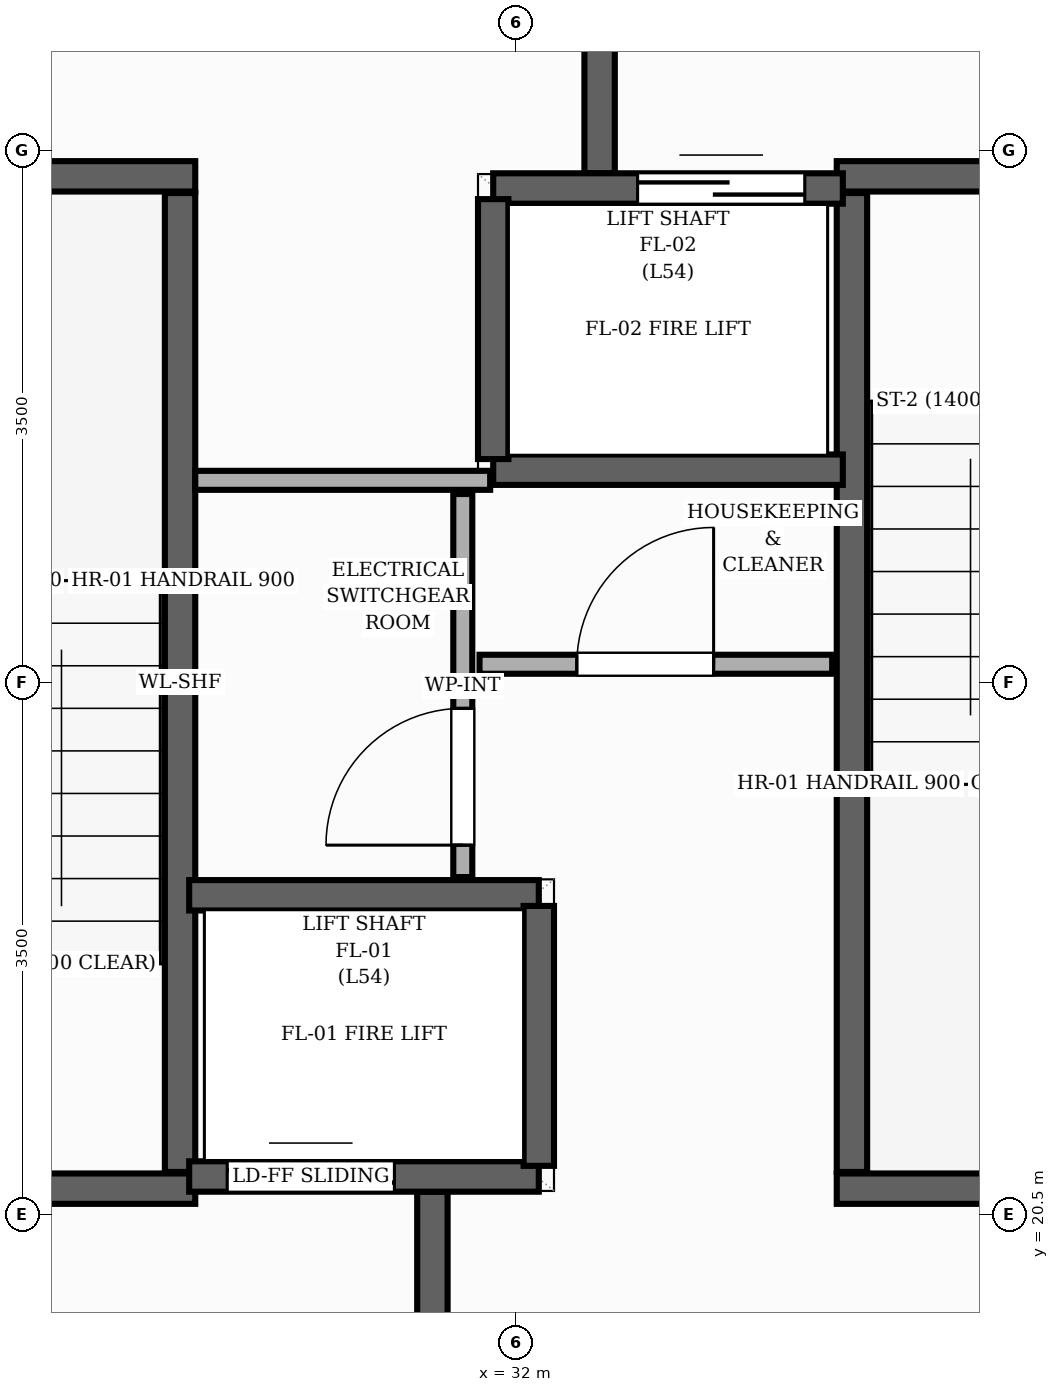
"""IFC4 building model, lengths in metres.
Left out: names, types, materials, properties, quantities, classifications, styles, units other than length and angle.
Written with IfcOpenShell. Run it as: python <this file> out.ifc"""

import sys

from ifc_helpers import new_model, si_unit, direction, frame, frame_2d, origin, place, context, subcontext, project, spatial, rectangle, extrude, element, fill, save


model = new_model("IFC4")
c1 = context("Model", 3, precision=1e-05, world=origin(), true_north=direction((0.0, 1.0)))
c2 = subcontext(c1, "Body", "Model", "MODEL_VIEW")
j1 = project(units=[si_unit("LENGTHUNIT", "METRE"), si_unit("PLANEANGLEUNIT", "RADIAN")], contexts=[c1])
p1 = place(None, origin())
s1 = spatial("IfcSite", under=j1, at=p1, CompositionType="ELEMENT")
p2 = place(p1, origin())
s2 = spatial("IfcBuilding", under=s1, at=p2, CompositionType="ELEMENT")
p3 = place(p2, frame((0.0, 0.0, 182.24)))
s3 = spatial("IfcBuildingStorey", under=s2, at=p3, CompositionType="ELEMENT", Elevation=182.24)
p4 = place(p3, frame((29.79, 20.78, 0.0), z_axis=(0.0, 0.0, 1.0), x_axis=(0.0, 1.0, 0.0)))
e1 = element("IfcWall", 1, at=p4, inside=s3, PredefinedType="SHEAR", context=c2, shape_type="SweptSolid", body=[
    extrude(rectangle(XDim=6.44, YDim=0.2, at=frame_2d((3.22, 0.0))), origin(), (0.0, 0.0, 1.0), 3.2),
])
p5 = place(p3, frame((26.65, 27.33, 0.0), z_axis=(0.0, 0.0, 1.0), x_axis=(1.0, 0.0, 0.0)))
e2 = element("IfcWall", 2, at=p5, inside=s3, PredefinedType="SHEAR", context=c2, shape_type="SweptSolid", body=[
    extrude(rectangle(XDim=3.24, YDim=0.2, at=frame_2d((1.62, 0.0))), origin(), (0.0, 0.0, 1.0), 3.2),
])
p6 = place(p3, frame((26.65, 20.67, 0.0), z_axis=(0.0, 0.0, 1.0), x_axis=(1.0, 0.0, 0.0)))
e3 = element("IfcWall", 3, at=p6, inside=s3, PredefinedType="SHEAR", context=c2, shape_type="SweptSolid", body=[
    extrude(rectangle(XDim=3.24, YDim=0.2, at=frame_2d((1.62, 0.0))), origin(), (0.0, 0.0, 1.0), 3.2),
])
p7 = place(p6, frame((1.055, 0.0, 0.0)))
e4 = element("IfcOpeningElement", 4, at=p7, cuts=e3, PredefinedType="OPENING", context=c2, shape_type="SweptSolid", body=[
    extrude(rectangle(XDim=1.05, YDim=2.15, at=frame_2d((0.525, 1.075))), frame((0.0, 0.11, 0.0), z_axis=(0.0, -1.0, 0.0), x_axis=(1.0, 0.0, 0.0)), (0.0, 0.0, 1.0), 0.22),
])
p8 = place(p3, frame((34.21, 20.78, 0.0), z_axis=(0.0, 0.0, 1.0), x_axis=(0.0, 1.0, 0.0)))
e5 = element("IfcWall", 5, at=p8, inside=s3, PredefinedType="SHEAR", context=c2, shape_type="SweptSolid", body=[
    extrude(rectangle(XDim=6.44, YDim=0.2, at=frame_2d((3.22, 0.0))), origin(), (0.0, 0.0, 1.0), 3.2),
])
p9 = place(p3, frame((34.11, 20.67, 0.0), z_axis=(0.0, 0.0, 1.0), x_axis=(1.0, 0.0, 0.0)))
e6 = element("IfcWall", 6, at=p9, inside=s3, PredefinedType="SHEAR", context=c2, shape_type="SweptSolid", body=[
    extrude(rectangle(XDim=3.24, YDim=0.2, at=frame_2d((1.62, 0.0))), origin(), (0.0, 0.0, 1.0), 3.2),
])
p10 = place(p3, frame((34.11, 27.33, 0.0), z_axis=(0.0, 0.0, 1.0), x_axis=(1.0, 0.0, 0.0)))
e7 = element("IfcWall", 7, at=p10, inside=s3, PredefinedType="SHEAR", context=c2, shape_type="SweptSolid", body=[
    extrude(rectangle(XDim=3.24, YDim=0.2, at=frame_2d((1.62, 0.0))), origin(), (0.0, 0.0, 1.0), 3.2),
])
p11 = place(p10, frame((1.135, 0.0, 0.0)))
e8 = element("IfcOpeningElement", 8, at=p11, cuts=e7, PredefinedType="OPENING", context=c2, shape_type="SweptSolid", body=[
    extrude(rectangle(XDim=1.05, YDim=2.15, at=frame_2d((0.525, 1.075))), frame((0.0, 0.11, 0.0), z_axis=(0.0, -1.0, 0.0), x_axis=(1.0, 0.0, 0.0)), (0.0, 0.0, 1.0), 0.22),
])
for number, where, z_axis, x_axis in (
    (9, (31.45, 17.15, 0.0), (0.0, 0.0, 1.0), (0.0, 1.0, 0.0)),
    (10, (32.55, 27.35, 0.0), (0.0, 0.0, 1.0), (0.0, 1.0, 0.0)),
):
    element("IfcWall", number, at=place(p3, frame(where, z_axis=z_axis, x_axis=x_axis)), inside=s3, PredefinedType="SHEAR", context=c2, shape_type="SweptSolid", body=[
        extrude(rectangle(XDim=3.5, YDim=0.2, at=frame_2d((1.75, 0.0))), origin(), (0.0, 0.0, 1.0), 3.2),
    ])
p12 = place(p3, frame((29.85, 20.75, 0.0), z_axis=(0.0, 0.0, 1.0), x_axis=(1.0, 0.0, 0.0)))
e11 = element("IfcWall", 11, at=p12, inside=s3, PredefinedType="SHEAR", context=c2, shape_type="SweptSolid", body=[
    extrude(rectangle(XDim=2.3, YDim=0.2, at=frame_2d((1.15, 0.0))), origin(), (0.0, 0.0, 1.0), 3.2),
])
p13 = place(p12, frame((0.25, 0.0, 0.0)))
e12 = element("IfcOpeningElement", 12, at=p13, cuts=e11, PredefinedType="OPENING", context=c2, shape_type="SweptSolid", body=[
    extrude(rectangle(XDim=1.1, YDim=2.15, at=frame_2d((0.55, 1.075))), frame((0.0, 0.11, 0.0), z_axis=(0.0, -1.0, 0.0), x_axis=(1.0, 0.0, 0.0)), (0.0, 0.0, 1.0), 0.22),
])
p14 = place(p3, frame((29.85, 22.6, 0.0), z_axis=(0.0, 0.0, 1.0), x_axis=(1.0, 0.0, 0.0)))
e13 = element("IfcWall", 13, at=p14, inside=s3, PredefinedType="SHEAR", context=c2, shape_type="SweptSolid", body=[
    extrude(rectangle(XDim=2.3, YDim=0.2, at=frame_2d((1.15, 0.0))), origin(), (0.0, 0.0, 1.0), 3.2),
])
p15 = place(p3, frame((32.15, 20.82, 0.0), z_axis=(0.0, 0.0, 1.0), x_axis=(0.0, 1.0, 0.0)))
e14 = element("IfcWall", 14, at=p15, inside=s3, PredefinedType="SHEAR", context=c2, shape_type="SweptSolid", body=[
    extrude(rectangle(XDim=1.71, YDim=0.2, at=frame_2d((0.855, 0.0))), origin(), (0.0, 0.0, 1.0), 3.2),
])
p16 = place(p3, frame((31.85, 27.25, 0.0), z_axis=(0.0, 0.0, 1.0), x_axis=(1.0, 0.0, 0.0)))
e15 = element("IfcWall", 15, at=p16, inside=s3, PredefinedType="SHEAR", context=c2, shape_type="SweptSolid", body=[
    extrude(rectangle(XDim=2.3, YDim=0.2, at=frame_2d((1.15, 0.0))), origin(), (0.0, 0.0, 1.0), 3.2),
])
p17 = place(p16, frame((0.95, 0.0, 0.0)))
e16 = element("IfcOpeningElement", 16, at=p17, cuts=e15, PredefinedType="OPENING", context=c2, shape_type="SweptSolid", body=[
    extrude(rectangle(XDim=1.1, YDim=2.15, at=frame_2d((0.55, 1.075))), frame((0.0, 0.11, 0.0), z_axis=(0.0, -1.0, 0.0), x_axis=(1.0, 0.0, 0.0)), (0.0, 0.0, 1.0), 0.22),
])
p18 = place(p3, frame((31.85, 25.4, 0.0), z_axis=(0.0, 0.0, 1.0), x_axis=(1.0, 0.0, 0.0)))
e17 = element("IfcWall", 17, at=p18, inside=s3, PredefinedType="SHEAR", context=c2, shape_type="SweptSolid", body=[
    extrude(rectangle(XDim=2.3, YDim=0.2, at=frame_2d((1.15, 0.0))), origin(), (0.0, 0.0, 1.0), 3.2),
])
p19 = place(p3, frame((31.85, 25.47, 0.0), z_axis=(0.0, 0.0, 1.0), x_axis=(0.0, 1.0, 0.0)))
e18 = element("IfcWall", 18, at=p19, inside=s3, PredefinedType="SHEAR", context=c2, shape_type="SweptSolid", body=[
    extrude(rectangle(XDim=1.71, YDim=0.2, at=frame_2d((0.855, 0.0))), origin(), (0.0, 0.0, 1.0), 3.2),
])
p20 = place(p3, frame((31.65, 22.72, 0.0), z_axis=(0.0, 0.0, 1.0), x_axis=(0.0, 1.0, 0.0)))
e19 = element("IfcWall", 19, at=p20, inside=s3, PredefinedType="PARTITIONING", context=c2, shape_type="SweptSolid", body=[
    extrude(rectangle(XDim=2.52, YDim=0.125, at=frame_2d((1.26, 0.0))), origin(), (0.0, 0.0, 1.0), 2.955),
])
p21 = place(p20, frame((0.21, 0.0, 0.0)))
e20 = element("IfcOpeningElement", 20, at=p21, cuts=e19, PredefinedType="OPENING", context=c2, shape_type="SweptSolid", body=[
    extrude(rectangle(XDim=0.9, YDim=2.1, at=frame_2d((0.45, 1.05))), frame((0.0, 0.073, 0.0), z_axis=(0.0, -1.0, 0.0), x_axis=(1.0, 0.0, 0.0)), (0.0, 0.0, 1.0), 0.145),
])
p22 = place(p3, frame((31.76, 24.12, 0.0), z_axis=(0.0, 0.0, 1.0), x_axis=(1.0, 0.0, 0.0)))
e21 = element("IfcWall", 21, at=p22, inside=s3, PredefinedType="PARTITIONING", context=c2, shape_type="SweptSolid", body=[
    extrude(rectangle(XDim=2.32, YDim=0.125, at=frame_2d((1.16, 0.0))), origin(), (0.0, 0.0, 1.0), 2.955),
])
p23 = place(p22, frame((0.64, 0.0, 0.0)))
e22 = element("IfcOpeningElement", 22, at=p23, cuts=e21, PredefinedType="OPENING", context=c2, shape_type="SweptSolid", body=[
    extrude(rectangle(XDim=0.9, YDim=2.1, at=frame_2d((0.45, 1.05))), frame((0.0, 0.073, 0.0), z_axis=(0.0, -1.0, 0.0), x_axis=(1.0, 0.0, 0.0)), (0.0, 0.0, 1.0), 0.145),
])
p24 = place(p3, frame((29.89, 25.33, 0.0), z_axis=(0.0, 0.0, 1.0), x_axis=(1.0, 0.0, 0.0)))
e23 = element("IfcWall", 23, at=p24, inside=s3, PredefinedType="PARTITIONING", context=c2, shape_type="SweptSolid", body=[
    extrude(rectangle(XDim=1.94, YDim=0.125, at=frame_2d((0.97, 0.0))), origin(), (0.0, 0.0, 1.0), 2.955),
])
p25 = place(p13, origin())
e24 = element("IfcDoor", 24, at=p25, inside=s3, OperationType="DOUBLE_DOOR_SLIDING", PredefinedType="DOOR", context=c2, shape_type="SweptSolid", body=[
    extrude(rectangle(XDim=1.1, YDim=2.15, at=frame_2d((0.55, 1.075))), frame((0.0, 0.025, 0.0), z_axis=(0.0, -1.0, 0.0), x_axis=(1.0, 0.0, 0.0)), (0.0, 0.0, 1.0), 0.05),
])
fill(e12, e24)
p26 = place(p17, origin())
e25 = element("IfcDoor", 25, at=p26, inside=s3, OperationType="DOUBLE_DOOR_SLIDING", PredefinedType="DOOR", context=c2, shape_type="SweptSolid", body=[
    extrude(rectangle(XDim=1.1, YDim=2.15, at=frame_2d((0.55, 1.075))), frame((0.0, 0.025, 0.0), z_axis=(0.0, -1.0, 0.0), x_axis=(1.0, 0.0, 0.0)), (0.0, 0.0, 1.0), 0.05),
])
fill(e16, e25)
p27 = place(p21, origin())
e26 = element("IfcDoor", 26, at=p27, inside=s3, OperationType="SINGLE_SWING_LEFT", PredefinedType="DOOR", context=c2, shape_type="SweptSolid", body=[
    extrude(rectangle(XDim=0.9, YDim=2.1, at=frame_2d((0.45, 1.05))), frame((0.0, 0.025, 0.0), z_axis=(0.0, -1.0, 0.0), x_axis=(1.0, 0.0, 0.0)), (0.0, 0.0, 1.0), 0.05),
])
fill(e20, e26)
p28 = place(p23, origin())
e27 = element("IfcDoor", 27, at=p28, inside=s3, OperationType="SINGLE_SWING_RIGHT", PredefinedType="DOOR", context=c2, shape_type="SweptSolid", body=[
    extrude(rectangle(XDim=0.9, YDim=2.1, at=frame_2d((0.45, 1.05))), frame((0.0, 0.025, 0.0), z_axis=(0.0, -1.0, 0.0), x_axis=(1.0, 0.0, 0.0)), (0.0, 0.0, 1.0), 0.05),
])
fill(e22, e27)
save(model, sys.argv[1])
